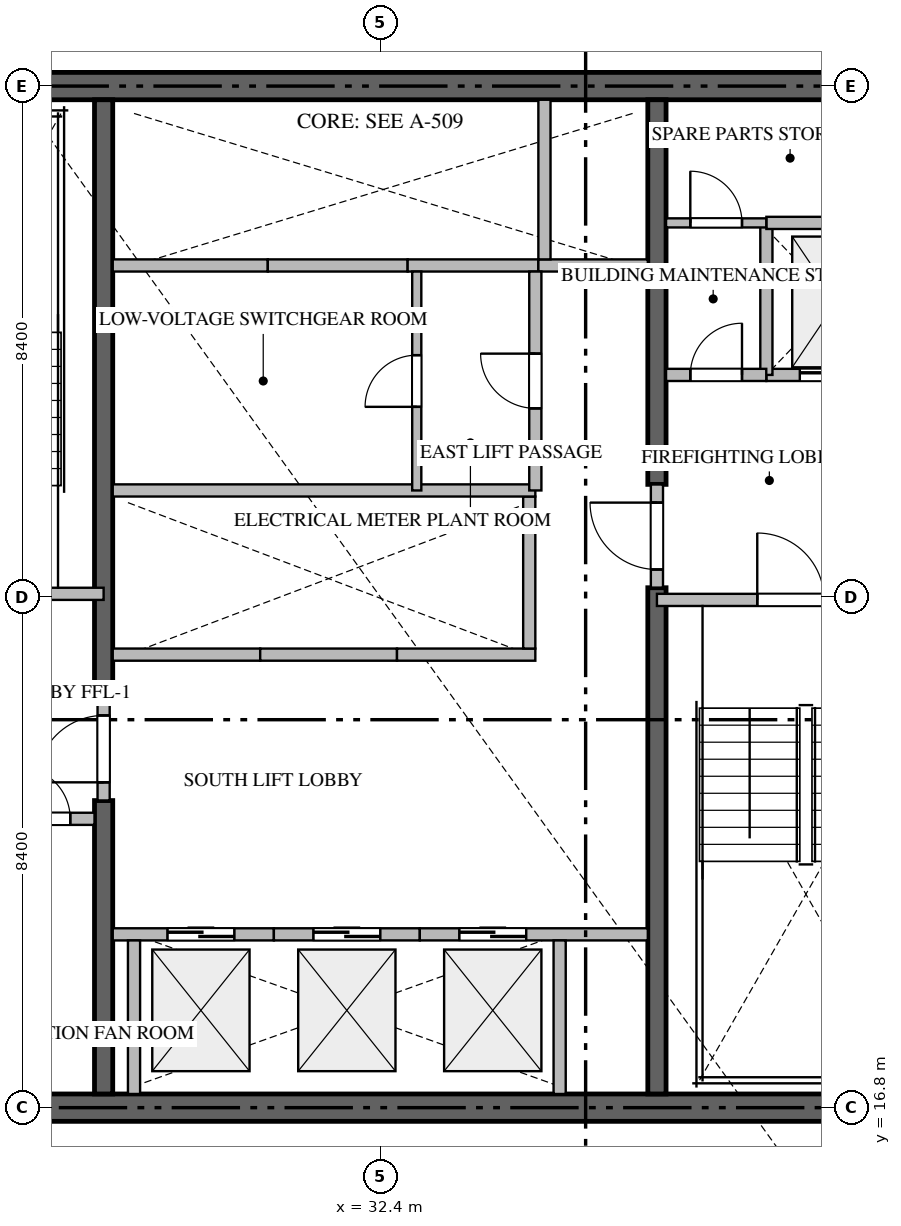
"""IFC4 building model, lengths in metres.
Left out: names, types, materials, properties, quantities, classifications, styles, units other than length and angle.
Written with IfcOpenShell. Run it as: python <this file> out.ifc"""

import sys

from ifc_helpers import new_model, si_unit, direction, frame, frame_2d, origin, place, context, subcontext, project, spatial, rectangle, extrude, source, transform, mapped, element, fill, save


model = new_model("IFC4")
c1 = context("Model", 3, precision=1e-05, world=origin(), true_north=direction((0.0, 1.0)))
c2 = subcontext(c1, "Body", "Model", "MODEL_VIEW")
j1 = project(units=[si_unit("LENGTHUNIT", "METRE"), si_unit("PLANEANGLEUNIT", "RADIAN")], contexts=[c1])
p1 = place(None, origin())
s1 = spatial("IfcSite", under=j1, at=p1, CompositionType="ELEMENT")
p2 = place(p1, origin())
s2 = spatial("IfcBuilding", under=s1, at=p2, CompositionType="ELEMENT")
p3 = place(p2, frame((0.0, 0.0, 45.45)))
s3 = spatial("IfcBuildingStorey", under=s2, at=p3, CompositionType="ELEMENT", Elevation=45.45)
for number, where, z_axis, x_axis in (
    (1, (23.4, 16.8, -0.26), (0.0, 0.0, 1.0), (1.0, 0.0, 0.0)),
    (2, (41.4, 33.6, -0.26), (0.0, 0.0, 1.0), (-1.0, 0.0, 0.0)),
):
    element("IfcWall", number, at=place(p3, frame(where, z_axis=z_axis, x_axis=x_axis)), inside=s3, PredefinedType="SHEAR", context=c2, shape_type="SweptSolid", body=[
        extrude(rectangle(XDim=18.0, YDim=0.45, at=frame_2d((9.0, 0.0))), origin(), (0.0, 0.0, 1.0), 3.748),
    ])
p4 = place(p3, frame((27.85, 17.025, -0.26), z_axis=(0.0, 0.0, 1.0), x_axis=(0.0, 1.0, 0.0)))
e3 = element("IfcWall", 3, at=p4, inside=s3, PredefinedType="SHEAR", context=c2, shape_type="SweptSolid", body=[
    extrude(rectangle(XDim=4.825, YDim=0.3, at=frame_2d((2.413, 0.0))), origin(), (0.0, 0.0, 1.0), 3.748),
])
p5 = place(p3, frame((27.85, 23.55, -0.26), z_axis=(0.0, 0.0, 1.0), x_axis=(0.0, 1.0, 0.0)))
e4 = element("IfcWall", 4, at=p5, inside=s3, PredefinedType="SHEAR", context=c2, shape_type="SweptSolid", body=[
    extrude(rectangle(XDim=9.825, YDim=0.3, at=frame_2d((4.913, 0.0))), origin(), (0.0, 0.0, 1.0), 3.748),
])
p6 = place(p3, frame((36.95, 17.025, -0.26), z_axis=(0.0, 0.0, 1.0), x_axis=(0.0, 1.0, 0.0)))
e5 = element("IfcWall", 5, at=p6, inside=s3, PredefinedType="SHEAR", context=c2, shape_type="SweptSolid", body=[
    extrude(rectangle(XDim=8.325, YDim=0.3, at=frame_2d((4.163, 0.0))), origin(), (0.0, 0.0, 1.0), 3.748),
])
p7 = place(p3, frame((36.95, 27.05, -0.26), z_axis=(0.0, 0.0, 1.0), x_axis=(0.0, 1.0, 0.0)))
e6 = element("IfcWall", 6, at=p7, inside=s3, PredefinedType="SHEAR", context=c2, shape_type="SweptSolid", body=[
    extrude(rectangle(XDim=6.325, YDim=0.3, at=frame_2d((3.163, 0.0))), origin(), (0.0, 0.0, 1.0), 3.748),
])
p8 = place(p3, frame((23.4, 25.25, 0.0), z_axis=(0.0, 0.0, 1.0), x_axis=(1.0, 0.0, 0.0)))
e7 = element("IfcWall", 7, at=p8, inside=s3, PredefinedType="STANDARD", context=c2, shape_type="SweptSolid", body=[
    extrude(rectangle(XDim=4.45, YDim=0.2, at=frame_2d((2.225, 0.0))), origin(), (0.0, 0.0, 1.0), 3.49),
])
p9 = place(p8, frame((1.65, 0.0, 0.0)))
e8 = element("IfcOpeningElement", 8, at=p9, cuts=e7, PredefinedType="OPENING", context=c2, shape_type="SweptSolid", body=[
    extrude(rectangle(XDim=1.1, YDim=2.15, at=frame_2d((0.55, 1.075))), frame((0.0, 0.11, 0.0), z_axis=(0.0, -1.0, 0.0), x_axis=(1.0, 0.0, 0.0)), (0.0, 0.0, 1.0), 0.22),
])
p10 = place(p3, frame((36.95, 25.15, 0.0), z_axis=(0.0, 0.0, 1.0), x_axis=(1.0, 0.0, 0.0)))
e9 = element("IfcWall", 9, at=p10, inside=s3, PredefinedType="STANDARD", context=c2, shape_type="SweptSolid", body=[
    extrude(rectangle(XDim=4.45, YDim=0.2, at=frame_2d((2.225, 0.0))), origin(), (0.0, 0.0, 1.0), 3.49),
])
p11 = place(p10, frame((1.65, 0.0, 0.0)))
e10 = element("IfcOpeningElement", 10, at=p11, cuts=e9, PredefinedType="OPENING", context=c2, shape_type="SweptSolid", body=[
    extrude(rectangle(XDim=1.1, YDim=2.15, at=frame_2d((0.55, 1.075))), frame((0.0, 0.11, 0.0), z_axis=(0.0, -1.0, 0.0), x_axis=(1.0, 0.0, 0.0)), (0.0, 0.0, 1.0), 0.22),
])
p12 = place(p3, frame((38.75, 28.85, 0.0), z_axis=(0.0, 0.0, 1.0), x_axis=(1.0, 0.0, 0.0)))
e11 = element("IfcWall", 11, at=p12, inside=s3, PredefinedType="STANDARD", context=c2, shape_type="SweptSolid", body=[
    extrude(rectangle(XDim=2.425, YDim=0.2, at=frame_2d((1.212, 0.0))), origin(), (0.0, 0.0, 1.0), 3.49),
])
p13 = place(p12, frame((0.55, 0.0, 0.0)))
e12 = element("IfcOpeningElement", 12, at=p13, cuts=e11, PredefinedType="OPENING", context=c2, shape_type="SweptSolid", body=[
    extrude(rectangle(XDim=1.2, YDim=2.2, at=frame_2d((0.6, 1.1))), frame((0.0, 0.11, 0.0), z_axis=(0.0, -1.0, 0.0), x_axis=(1.0, 0.0, 0.0)), (0.0, 0.0, 1.0), 0.22),
])
p14 = place(p3, frame((28.0, 19.65, 0.0), z_axis=(0.0, 0.0, 1.0), x_axis=(1.0, 0.0, 0.0)))
e13 = element("IfcWall", 13, at=p14, inside=s3, PredefinedType="STANDARD", context=c2, shape_type="SweptSolid", body=[
    extrude(rectangle(XDim=2.65, YDim=0.2, at=frame_2d((1.325, 0.0))), origin(), (0.0, 0.0, 1.0), 3.49),
])
p15 = place(p14, frame((0.9, 0.0, 0.0)))
e14 = element("IfcOpeningElement", 14, at=p15, cuts=e13, PredefinedType="OPENING", context=c2, shape_type="SweptSolid", body=[
    extrude(rectangle(XDim=1.1, YDim=2.2, at=frame_2d((0.55, 1.1))), frame((0.0, 0.11, 0.0), z_axis=(0.0, -1.0, 0.0), x_axis=(1.0, 0.0, 0.0)), (0.0, 0.0, 1.0), 0.22),
])
p16 = place(p3, frame((28.35, 17.025, 0.0), z_axis=(0.0, 0.0, 1.0), x_axis=(0.0, 1.0, 0.0)))
e15 = element("IfcWall", 15, at=p16, inside=s3, PredefinedType="STANDARD", context=c2, shape_type="SweptSolid", body=[
    extrude(rectangle(XDim=2.525, YDim=0.2, at=frame_2d((1.263, 0.0))), origin(), (0.0, 0.0, 1.0), 3.49),
])
p17 = place(p3, frame((30.65, 19.65, 0.0), z_axis=(0.0, 0.0, 1.0), x_axis=(1.0, 0.0, 0.0)))
e16 = element("IfcWall", 16, at=p17, inside=s3, PredefinedType="STANDARD", context=c2, shape_type="SweptSolid", body=[
    extrude(rectangle(XDim=2.4, YDim=0.2, at=frame_2d((1.2, 0.0))), origin(), (0.0, 0.0, 1.0), 3.49),
])
p18 = place(p17, frame((0.65, 0.0, 0.0)))
e17 = element("IfcOpeningElement", 17, at=p18, cuts=e16, PredefinedType="OPENING", context=c2, shape_type="SweptSolid", body=[
    extrude(rectangle(XDim=1.1, YDim=2.2, at=frame_2d((0.55, 1.1))), frame((0.0, 0.11, 0.0), z_axis=(0.0, -1.0, 0.0), x_axis=(1.0, 0.0, 0.0)), (0.0, 0.0, 1.0), 0.22),
])
p19 = place(p3, frame((33.05, 19.65, 0.0), z_axis=(0.0, 0.0, 1.0), x_axis=(1.0, 0.0, 0.0)))
e18 = element("IfcWall", 18, at=p19, inside=s3, PredefinedType="STANDARD", context=c2, shape_type="SweptSolid", body=[
    extrude(rectangle(XDim=3.75, YDim=0.2, at=frame_2d((1.875, 0.0))), origin(), (0.0, 0.0, 1.0), 3.49),
])
p20 = place(p19, frame((0.65, 0.0, 0.0)))
e19 = element("IfcOpeningElement", 19, at=p20, cuts=e18, PredefinedType="OPENING", context=c2, shape_type="SweptSolid", body=[
    extrude(rectangle(XDim=1.1, YDim=2.2, at=frame_2d((0.55, 1.1))), frame((0.0, 0.11, 0.0), z_axis=(0.0, -1.0, 0.0), x_axis=(1.0, 0.0, 0.0)), (0.0, 0.0, 1.0), 0.22),
])
p21 = place(p3, frame((35.35, 17.025, 0.0), z_axis=(0.0, 0.0, 1.0), x_axis=(0.0, 1.0, 0.0)))
e20 = element("IfcWall", 20, at=p21, inside=s3, PredefinedType="STANDARD", context=c2, shape_type="SweptSolid", body=[
    extrude(rectangle(XDim=2.525, YDim=0.2, at=frame_2d((1.263, 0.0))), origin(), (0.0, 0.0, 1.0), 3.49),
])
p22 = place(p3, frame((28.0, 24.25, 0.0), z_axis=(0.0, 0.0, 1.0), x_axis=(1.0, 0.0, 0.0)))
e21 = element("IfcWall", 21, at=p22, inside=s3, PredefinedType="STANDARD", context=c2, shape_type="SweptSolid", body=[
    extrude(rectangle(XDim=2.425, YDim=0.2, at=frame_2d((1.212, 0.0))), origin(), (0.0, 0.0, 1.0), 3.49),
])
p23 = place(p3, frame((30.425, 24.25, 0.0), z_axis=(0.0, 0.0, 1.0), x_axis=(1.0, 0.0, 0.0)))
e22 = element("IfcWall", 22, at=p23, inside=s3, PredefinedType="STANDARD", context=c2, shape_type="SweptSolid", body=[
    extrude(rectangle(XDim=2.25, YDim=0.2, at=frame_2d((1.125, 0.0))), origin(), (0.0, 0.0, 1.0), 3.49),
])
p24 = place(p3, frame((32.675, 24.25, 0.0), z_axis=(0.0, 0.0, 1.0), x_axis=(1.0, 0.0, 0.0)))
e23 = element("IfcWall", 23, at=p24, inside=s3, PredefinedType="STANDARD", context=c2, shape_type="SweptSolid", body=[
    extrude(rectangle(XDim=2.275, YDim=0.2, at=frame_2d((1.137, 0.0))), origin(), (0.0, 0.0, 1.0), 3.49),
])
p25 = place(p3, frame((34.85, 24.35, 0.0), z_axis=(0.0, 0.0, 1.0), x_axis=(0.0, 1.0, 0.0)))
e24 = element("IfcWall", 24, at=p25, inside=s3, PredefinedType="STANDARD", context=c2, shape_type="SweptSolid", body=[
    extrude(rectangle(XDim=2.5, YDim=0.2, at=frame_2d((1.25, 0.0))), origin(), (0.0, 0.0, 1.0), 3.49),
])
p26 = place(p3, frame((28.0, 30.65, 0.0), z_axis=(0.0, 0.0, 1.0), x_axis=(1.0, 0.0, 0.0)))
e25 = element("IfcWall", 25, at=p26, inside=s3, PredefinedType="STANDARD", context=c2, shape_type="SweptSolid", body=[
    extrude(rectangle(XDim=2.55, YDim=0.2, at=frame_2d((1.275, 0.0))), origin(), (0.0, 0.0, 1.0), 3.49),
])
p27 = place(p3, frame((30.55, 30.65, 0.0), z_axis=(0.0, 0.0, 1.0), x_axis=(1.0, 0.0, 0.0)))
e26 = element("IfcWall", 26, at=p27, inside=s3, PredefinedType="STANDARD", context=c2, shape_type="SweptSolid", body=[
    extrude(rectangle(XDim=2.3, YDim=0.2, at=frame_2d((1.15, 0.0))), origin(), (0.0, 0.0, 1.0), 3.49),
])
p28 = place(p3, frame((32.85, 30.65, 0.0), z_axis=(0.0, 0.0, 1.0), x_axis=(1.0, 0.0, 0.0)))
e27 = element("IfcWall", 27, at=p28, inside=s3, PredefinedType="STANDARD", context=c2, shape_type="SweptSolid", body=[
    extrude(rectangle(XDim=2.15, YDim=0.2, at=frame_2d((1.075, 0.0))), origin(), (0.0, 0.0, 1.0), 3.49),
])
p29 = place(p3, frame((35.0, 30.65, 0.0), z_axis=(0.0, 0.0, 1.0), x_axis=(1.0, 0.0, 0.0)))
e28 = element("IfcWall", 28, at=p29, inside=s3, PredefinedType="STANDARD", context=c2, shape_type="SweptSolid", body=[
    extrude(rectangle(XDim=1.8, YDim=0.2, at=frame_2d((0.9, 0.0))), origin(), (0.0, 0.0, 1.0), 3.49),
])
p30 = place(p3, frame((35.1, 30.75, 0.0), z_axis=(0.0, 0.0, 1.0), x_axis=(0.0, 1.0, 0.0)))
e29 = element("IfcWall", 29, at=p30, inside=s3, PredefinedType="STANDARD", context=c2, shape_type="SweptSolid", body=[
    extrude(rectangle(XDim=2.625, YDim=0.2, at=frame_2d((1.312, 0.0))), origin(), (0.0, 0.0, 1.0), 3.49),
])
p31 = place(p3, frame((26.052, 21.55, 0.0), z_axis=(0.0, 0.0, 1.0), x_axis=(1.0, 0.0, 0.0)))
e30 = element("IfcWall", 30, at=p31, inside=s3, PredefinedType="STANDARD", context=c2, shape_type="SweptSolid", body=[
    extrude(rectangle(XDim=1.648, YDim=0.2, at=frame_2d((0.824, 0.0))), origin(), (0.0, 0.0, 1.0), 3.49),
])
p32 = place(p31, frame((0.399, 0.0, 0.0)))
e31 = element("IfcOpeningElement", 31, at=p32, cuts=e30, PredefinedType="OPENING", context=c2, shape_type="SweptSolid", body=[
    extrude(rectangle(XDim=0.85, YDim=2.1, at=frame_2d((0.425, 1.05))), frame((0.0, 0.11, 0.0), z_axis=(0.0, -1.0, 0.0), x_axis=(1.0, 0.0, 0.0)), (0.0, 0.0, 1.0), 0.22),
])
p33 = place(p3, frame((38.75, 28.85, 0.0), z_axis=(0.0, 0.0, 1.0), x_axis=(0.0, 1.0, 0.0)))
e32 = element("IfcWall", 32, at=p33, inside=s3, PredefinedType="STANDARD", context=c2, shape_type="SweptSolid", body=[
    extrude(rectangle(XDim=2.5, YDim=0.2, at=frame_2d((1.25, 0.0))), origin(), (0.0, 0.0, 1.0), 3.49),
])
p34 = place(p3, frame((38.75, 31.35, 0.0), z_axis=(0.0, 0.0, 1.0), x_axis=(1.0, 0.0, 0.0)))
e33 = element("IfcWall", 33, at=p34, inside=s3, PredefinedType="STANDARD", context=c2, shape_type="SweptSolid", body=[
    extrude(rectangle(XDim=2.425, YDim=0.2, at=frame_2d((1.212, 0.0))), origin(), (0.0, 0.0, 1.0), 3.49),
])
p35 = place(p3, frame((37.1, 28.85, 0.0), z_axis=(0.0, 0.0, 1.0), x_axis=(1.0, 0.0, 0.0)))
e34 = element("IfcWall", 34, at=p35, inside=s3, PredefinedType="STANDARD", context=c2, shape_type="SweptSolid", body=[
    extrude(rectangle(XDim=1.648, YDim=0.2, at=frame_2d((0.824, 0.0))), origin(), (0.0, 0.0, 1.0), 3.49),
])
p36 = place(p35, frame((0.399, 0.0, 0.0)))
e35 = element("IfcOpeningElement", 35, at=p36, cuts=e34, PredefinedType="OPENING", context=c2, shape_type="SweptSolid", body=[
    extrude(rectangle(XDim=0.85, YDim=2.1, at=frame_2d((0.425, 1.05))), frame((0.0, 0.11, 0.0), z_axis=(0.0, -1.0, 0.0), x_axis=(1.0, 0.0, 0.0)), (0.0, 0.0, 1.0), 0.22),
])
p37 = place(p3, frame((27.85, 21.852, 0.0), z_axis=(0.0, 0.0, 1.0), x_axis=(0.0, 1.0, 0.0)))
e36 = element("IfcWall", 36, at=p37, inside=s3, PredefinedType="STANDARD", context=c2, shape_type="SweptSolid", body=[
    extrude(rectangle(XDim=1.696, YDim=0.2, at=frame_2d((0.848, 0.0))), origin(), (0.0, 0.0, 1.0), 3.49),
])
p38 = place(p37, frame((0.298, 0.0, 0.0)))
e37 = element("IfcOpeningElement", 37, at=p38, cuts=e36, PredefinedType="OPENING", context=c2, shape_type="SweptSolid", body=[
    extrude(rectangle(XDim=1.1, YDim=2.15, at=frame_2d((0.55, 1.075))), frame((0.0, 0.11, 0.0), z_axis=(0.0, -1.0, 0.0), x_axis=(1.0, 0.0, 0.0)), (0.0, 0.0, 1.0), 0.22),
])
p39 = place(p3, frame((36.95, 25.352, 0.0), z_axis=(0.0, 0.0, 1.0), x_axis=(0.0, 1.0, 0.0)))
e38 = element("IfcWall", 38, at=p39, inside=s3, PredefinedType="STANDARD", context=c2, shape_type="SweptSolid", body=[
    extrude(rectangle(XDim=1.696, YDim=0.2, at=frame_2d((0.848, 0.0))), origin(), (0.0, 0.0, 1.0), 3.49),
])
p40 = place(p39, frame((0.298, 0.0, 0.0)))
e39 = element("IfcOpeningElement", 39, at=p40, cuts=e38, PredefinedType="OPENING", context=c2, shape_type="SweptSolid", body=[
    extrude(rectangle(XDim=1.1, YDim=2.15, at=frame_2d((0.55, 1.075))), frame((0.0, 0.11, 0.0), z_axis=(0.0, -1.0, 0.0), x_axis=(1.0, 0.0, 0.0)), (0.0, 0.0, 1.0), 0.22),
])
p41 = place(p3, frame((28.0, 26.95, 0.0), z_axis=(0.0, 0.0, 1.0), x_axis=(1.0, 0.0, 0.0)))
e40 = element("IfcWall", 40, at=p41, inside=s3, PredefinedType="STANDARD", context=c2, shape_type="SweptSolid", body=[
    extrude(rectangle(XDim=6.95, YDim=0.2, at=frame_2d((3.475, 0.0))), origin(), (0.0, 0.0, 1.0), 3.49),
])
p42 = place(p3, frame((37.1, 31.35, 0.0), z_axis=(0.0, 0.0, 1.0), x_axis=(1.0, 0.0, 0.0)))
e41 = element("IfcWall", 41, at=p42, inside=s3, PredefinedType="PARTITIONING", context=c2, shape_type="SweptSolid", body=[
    extrude(rectangle(XDim=1.648, YDim=0.15, at=frame_2d((0.824, 0.0))), origin(), (0.0, 0.0, 1.0), 3.49),
])
p43 = place(p42, frame((0.399, 0.0, 0.0)))
e42 = element("IfcOpeningElement", 42, at=p43, cuts=e41, PredefinedType="OPENING", context=c2, shape_type="SweptSolid", body=[
    extrude(rectangle(XDim=0.85, YDim=2.1, at=frame_2d((0.425, 1.05))), frame((0.0, 0.085, 0.0), z_axis=(0.0, -1.0, 0.0), x_axis=(1.0, 0.0, 0.0)), (0.0, 0.0, 1.0), 0.17),
])
p44 = place(p3, frame((34.95, 26.95, 0.0), z_axis=(0.0, 0.0, 1.0), x_axis=(0.0, 1.0, 0.0)))
e43 = element("IfcWall", 43, at=p44, inside=s3, PredefinedType="STANDARD", context=c2, shape_type="SweptSolid", body=[
    extrude(rectangle(XDim=3.6, YDim=0.2, at=frame_2d((1.8, 0.0))), origin(), (0.0, 0.0, 1.0), 3.49),
])
p45 = place(p44, frame((1.35, 0.0, 0.0)))
e44 = element("IfcOpeningElement", 44, at=p45, cuts=e43, PredefinedType="OPENING", context=c2, shape_type="SweptSolid", body=[
    extrude(rectangle(XDim=0.9, YDim=2.1, at=frame_2d((0.45, 1.05))), frame((0.0, 0.11, 0.0), z_axis=(0.0, -1.0, 0.0), x_axis=(1.0, 0.0, 0.0)), (0.0, 0.0, 1.0), 0.22),
])
p46 = place(p3, frame((33.0, 26.95, 0.0), z_axis=(0.0, 0.0, 1.0), x_axis=(0.0, 1.0, 0.0)))
e45 = element("IfcWall", 45, at=p46, inside=s3, PredefinedType="PARTITIONING", context=c2, shape_type="SweptSolid", body=[
    extrude(rectangle(XDim=3.6, YDim=0.15, at=frame_2d((1.8, 0.0))), origin(), (0.0, 0.0, 1.0), 3.49),
])
p47 = place(p46, frame((1.375, 0.0, 0.0)))
e46 = element("IfcOpeningElement", 46, at=p47, cuts=e45, PredefinedType="OPENING", context=c2, shape_type="SweptSolid", body=[
    extrude(rectangle(XDim=0.85, YDim=2.1, at=frame_2d((0.425, 1.05))), frame((0.0, 0.085, 0.0), z_axis=(0.0, -1.0, 0.0), x_axis=(1.0, 0.0, 0.0)), (0.0, 0.0, 1.0), 0.17),
])
m1 = source(origin(), c2, "Body", "SweptSolid", [
    extrude(rectangle(XDim=1.1, YDim=2.15, at=frame_2d((0.55, 1.075))), frame((0.0, 0.025, 0.0), z_axis=(0.0, -1.0, 0.0), x_axis=(1.0, 0.0, 0.0)), (0.0, 0.0, 1.0), 0.05),
])
p48 = place(p11, origin())
e47 = element("IfcDoor", 47, at=p48, inside=s3, OperationType="SINGLE_SWING_LEFT", PredefinedType="DOOR", context=c2, shape_type="MappedRepresentation", body=[
    mapped(m1, transform((0.0, 0.0, 0.0), scale=1.0)),
])
fill(e10, e47)
m2 = source(origin(), c2, "Body", "SweptSolid", [
    extrude(rectangle(XDim=1.2, YDim=2.2, at=frame_2d((0.6, 1.1))), frame((0.0, 0.025, 0.0), z_axis=(0.0, -1.0, 0.0), x_axis=(1.0, 0.0, 0.0)), (0.0, 0.0, 1.0), 0.05),
])
p49 = place(p13, origin())
e48 = element("IfcDoor", 48, at=p49, inside=s3, OperationType="DOUBLE_DOOR_SLIDING", PredefinedType="DOOR", context=c2, shape_type="MappedRepresentation", body=[
    mapped(m2, transform((0.0, 0.0, 0.0), scale=1.0)),
])
fill(e12, e48)
m3 = source(origin(), c2, "Body", "SweptSolid", [
    extrude(rectangle(XDim=1.1, YDim=2.2, at=frame_2d((0.55, 1.1))), frame((0.0, 0.025, 0.0), z_axis=(0.0, -1.0, 0.0), x_axis=(1.0, 0.0, 0.0)), (0.0, 0.0, 1.0), 0.05),
])
p50 = place(p15, origin())
e49 = element("IfcDoor", 49, at=p50, inside=s3, OperationType="DOUBLE_DOOR_SLIDING", PredefinedType="DOOR", context=c2, shape_type="MappedRepresentation", body=[
    mapped(m3, transform((0.0, 0.0, 0.0), scale=1.0)),
])
fill(e14, e49)
p51 = place(p18, origin())
e50 = element("IfcDoor", 50, at=p51, inside=s3, OperationType="DOUBLE_DOOR_SLIDING", PredefinedType="DOOR", context=c2, shape_type="MappedRepresentation", body=[
    mapped(m3, transform((0.0, 0.0, 0.0), scale=1.0)),
])
fill(e17, e50)
p52 = place(p20, origin())
e51 = element("IfcDoor", 51, at=p52, inside=s3, OperationType="DOUBLE_DOOR_SLIDING", PredefinedType="DOOR", context=c2, shape_type="MappedRepresentation", body=[
    mapped(m3, transform((0.0, 0.0, 0.0), scale=1.0)),
])
fill(e19, e51)
m4 = source(origin(), c2, "Body", "SweptSolid", [
    extrude(rectangle(XDim=0.85, YDim=2.1, at=frame_2d((0.425, 1.05))), frame((0.0, 0.025, 0.0), z_axis=(0.0, -1.0, 0.0), x_axis=(1.0, 0.0, 0.0)), (0.0, 0.0, 1.0), 0.05),
])
p53 = place(p32, origin())
e52 = element("IfcDoor", 52, at=p53, inside=s3, OperationType="SINGLE_SWING_LEFT", PredefinedType="DOOR", context=c2, shape_type="MappedRepresentation", body=[
    mapped(m4, transform((0.0, 0.0, 0.0), scale=1.0)),
])
fill(e31, e52)
p54 = place(p36, origin())
e53 = element("IfcDoor", 53, at=p54, inside=s3, OperationType="SINGLE_SWING_RIGHT", PredefinedType="DOOR", context=c2, shape_type="MappedRepresentation", body=[
    mapped(m4, transform((0.0, 0.0, 0.0), scale=1.0)),
])
fill(e35, e53)
p55 = place(p38, origin())
e54 = element("IfcDoor", 54, at=p55, inside=s3, OperationType="SINGLE_SWING_LEFT", PredefinedType="DOOR", context=c2, shape_type="MappedRepresentation", body=[
    mapped(m1, transform((0.0, 0.0, 0.0), scale=1.0)),
])
fill(e37, e54)
p56 = place(p40, origin())
e55 = element("IfcDoor", 55, at=p56, inside=s3, OperationType="SINGLE_SWING_RIGHT", PredefinedType="DOOR", context=c2, shape_type="MappedRepresentation", body=[
    mapped(m1, transform((0.0, 0.0, 0.0), scale=1.0)),
])
fill(e39, e55)
p57 = place(p43, origin())
e56 = element("IfcDoor", 56, at=p57, inside=s3, OperationType="SINGLE_SWING_LEFT", PredefinedType="DOOR", context=c2, shape_type="MappedRepresentation", body=[
    mapped(m4, transform((0.0, 0.0, 0.0), scale=1.0)),
])
fill(e42, e56)
m5 = source(origin(), c2, "Body", "SweptSolid", [
    extrude(rectangle(XDim=0.9, YDim=2.1, at=frame_2d((0.45, 1.05))), frame((0.0, 0.025, 0.0), z_axis=(0.0, -1.0, 0.0), x_axis=(1.0, 0.0, 0.0)), (0.0, 0.0, 1.0), 0.05),
])
p58 = place(p45, origin())
e57 = element("IfcDoor", 57, at=p58, inside=s3, OperationType="SINGLE_SWING_RIGHT", PredefinedType="DOOR", context=c2, shape_type="MappedRepresentation", body=[
    mapped(m5, transform((0.0, 0.0, 0.0), scale=1.0)),
])
fill(e44, e57)
p59 = place(p47, origin())
e58 = element("IfcDoor", 58, at=p59, inside=s3, OperationType="SINGLE_SWING_LEFT", PredefinedType="DOOR", context=c2, shape_type="MappedRepresentation", body=[
    mapped(m4, transform((0.0, 0.0, 0.0), scale=1.0)),
])
fill(e46, e58)
save(model, sys.argv[1])
